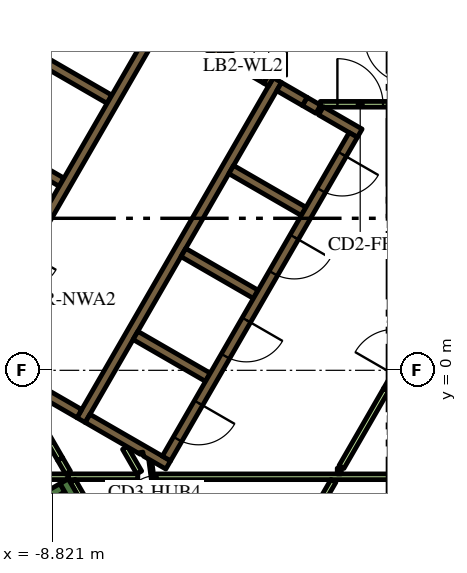
"""IFC4 building model, lengths in metres.
Left out: names, types, materials, properties, quantities, classifications, styles, units other than length and angle.
Written with IfcOpenShell. Run it as: python <this file> out.ifc"""

import sys

from ifc_helpers import new_model, si_unit, direction, frame, frame_2d, origin, place, context, subcontext, project, spatial, polyline, rectangle, outline, extrude, element, fill, save


model = new_model("IFC4")
c1 = context("Model", 3, precision=1e-05, world=origin(), true_north=direction((0.0, 1.0)))
c2 = subcontext(c1, "Body", "Model", "MODEL_VIEW")
j1 = project(units=[si_unit("LENGTHUNIT", "METRE"), si_unit("PLANEANGLEUNIT", "RADIAN")], contexts=[c1])
p1 = place(None, origin())
s1 = spatial("IfcSite", under=j1, at=p1, CompositionType="ELEMENT")
p2 = place(p1, origin())
s2 = spatial("IfcBuilding", under=s1, at=p2, CompositionType="ELEMENT")
p3 = place(p2, frame((0.0, 0.0, 62.7)))
s3 = spatial("IfcBuildingStorey", under=s2, at=p3, CompositionType="ELEMENT", Elevation=62.7)
p4 = place(p3, frame((-14.268, 0.387, 0.0), z_axis=(0.0, 0.0, 1.0), x_axis=(0.499994617707, 0.866028511231, 0.0)))
e1 = element("IfcWall", 1, at=p4, inside=s3, PredefinedType="SOLIDWALL", context=c2, shape_type="SweptSolid", body=[
    extrude(rectangle(XDim=18.817, YDim=0.9, at=frame_2d((9.409, 0.0))), origin(), (0.0, 0.0, 1.0), 3.9),
])
p5 = place(p3, frame((-14.44, -6.49, 0.0), z_axis=(0.0, 0.0, 1.0), x_axis=(0.866022966069, 0.500004222222, 0.0)))
e2 = element("IfcWall", 2, at=p5, inside=s3, PredefinedType="SOLIDWALL", context=c2, shape_type="SweptSolid", body=[
    extrude(rectangle(XDim=6.8, YDim=0.25, at=frame_2d((3.4, 0.0))), origin(), (0.0, 0.0, 1.0), 3.9),
])
p6 = place(p3, frame((-8.163, -3.511, 0.0), z_axis=(0.0, 0.0, 1.0), x_axis=(-0.500206266495, 0.865906283012, 0.0)))
e3 = element("IfcWall", 3, at=p6, inside=s3, PredefinedType="SOLIDWALL", context=c2, shape_type="SweptSolid", body=[
    extrude(rectangle(XDim=0.684, YDim=0.25, at=frame_2d((0.342, 0.0))), origin(), (0.0, 0.0, 1.0), 3.9),
])
p7 = place(p3, frame((-8.06, -1.311, 0.0), z_axis=(0.0, 0.0, 1.0), x_axis=(0.50000273126, 0.866023826885, 0.0)))
e4 = element("IfcWall", 4, at=p7, inside=s3, PredefinedType="SOLIDWALL", context=c2, shape_type="SweptSolid", body=[
    extrude(rectangle(XDim=10.33, YDim=0.25, at=frame_2d((5.165, 0.0))), origin(), (0.0, 0.0, 1.0), 3.9),
])
p8 = place(p3, frame((-1.819, 6.87, 0.0), z_axis=(0.0, 0.0, 1.0), x_axis=(-0.866294599386, 0.499533449405, 0.0)))
e5 = element("IfcWall", 5, at=p8, inside=s3, PredefinedType="SOLIDWALL", context=c2, shape_type="SweptSolid", body=[
    extrude(rectangle(XDim=0.41, YDim=0.25, at=frame_2d((0.205, 0.0))), origin(), (0.0, 0.0, 1.0), 3.9),
])
p9 = place(p3, frame((-2.849, 7.465, 0.0), z_axis=(0.0, 0.0, 1.0), x_axis=(0.865955664968, -0.500120771724, 0.0)))
e6 = element("IfcWall", 6, at=p9, inside=s3, PredefinedType="SOLIDWALL", context=c2, shape_type="SweptSolid", body=[
    extrude(rectangle(XDim=0.778, YDim=0.25, at=frame_2d((0.389, 0.0))), origin(), (0.0, 0.0, 1.0), 3.9),
])
p10 = place(p3, frame((-0.728, 6.24, 0.0), z_axis=(0.0, 0.0, 1.0), x_axis=(-0.866002680491, 0.500039355833, 0.0)))
e7 = element("IfcWall", 7, at=p10, inside=s3, PredefinedType="SOLIDWALL", context=c2, shape_type="SweptSolid", body=[
    extrude(rectangle(XDim=1.178, YDim=0.25, at=frame_2d((0.589, 0.0))), origin(), (0.0, 0.0, 1.0), 3.9),
])
for number, where, z_axis, x_axis in (
    (8, (-2.204, 4.182, 0.0), (0.0, 0.0, 1.0), (-0.866, 0.5, 0.0)),
    (9, (-5.369, 3.1, 0.0), (0.0, 0.0, 1.0), (0.866, -0.5, 0.0)),
    (10, (-4.724, -0.182, 0.0), (0.0, 0.0, 1.0), (-0.866, 0.5, 0.0)),
):
    element("IfcWall", number, at=place(p3, frame(where, z_axis=z_axis, x_axis=x_axis)), inside=s3, PredefinedType="SOLIDWALL", context=c2, shape_type="SweptSolid", body=[
        extrude(rectangle(XDim=2.2, YDim=0.25, at=frame_2d((1.1, 0.0))), origin(), (0.0, 0.0, 1.0), 3.9),
    ])
p11 = place(p3, origin())
e11 = element("IfcWall", 11, at=p11, inside=s3, PredefinedType="SOLIDWALL", context=c2, shape_type="SweptSolid", body=[
    extrude(outline(polyline([(-5.922, -2.257), (-5.922, -2.257), (-5.705, -2.382), (-5.83, -2.598), (-6.418, -2.258), (-6.433, -2.153), (-6.433, -2.153), (-6.433, -2.153), (-6.508, -2.163), (-6.508, -2.163), (-6.508, -2.163), (-6.501, -2.21), (-7.952, -1.373), (-7.827, -1.156), (-5.922, -2.257)])), origin(), (0.0, 0.0, 1.0), 3.9),
])
p12 = place(p3, frame((-9.265, -0.471, 0.0), z_axis=(0.0, 0.0, 1.0), x_axis=(0.865954634268, -0.500122556369, 0.0)))
e12 = element("IfcWall", 12, at=p12, inside=s3, PredefinedType="SOLIDWALL", context=c2, shape_type="SweptSolid", body=[
    extrude(rectangle(XDim=1.338, YDim=0.25, at=frame_2d((0.669, 0.0))), origin(), (0.0, 0.0, 1.0), 3.9),
])
e13 = element("IfcWall", 13, at=p11, inside=s3, PredefinedType="SOLIDWALL", context=c2, shape_type="SweptSolid", body=[
    extrude(outline(polyline([(-3.128, 7.481), (-3.259, 7.557), (-3.134, 7.773), (-3.003, 7.698), (-3.128, 7.481)])), origin(), (0.0, 0.0, 1.0), 3.9),
])
for number, where, z_axis, x_axis in (
    (14, (-8.574, 4.95, 0.0), (0.0, 0.0, 1.0), (-0.866, 0.5, 0.0)),
    (15, (-7.314, 7.132, 0.0), (0.0, 0.0, 1.0), (-0.866, 0.5, 0.0)),
):
    element("IfcWall", number, at=place(p3, frame(where, z_axis=z_axis, x_axis=x_axis)), inside=s3, PredefinedType="SOLIDWALL", context=c2, shape_type="SweptSolid", body=[
        extrude(rectangle(XDim=2.2, YDim=0.25, at=frame_2d((1.1, 0.0))), origin(), (0.0, 0.0, 1.0), 3.9),
    ])
p13 = place(p3, frame((-7.959, 10.415, 0.0), z_axis=(0.0, 0.0, 1.0), x_axis=(0.866020958405, -0.500007699544, 0.0)))
e16 = element("IfcWall", 16, at=p13, inside=s3, PredefinedType="SOLIDWALL", context=c2, shape_type="SweptSolid", body=[
    extrude(rectangle(XDim=4.1, YDim=0.25, at=frame_2d((2.05, 0.0))), origin(), (0.0, 0.0, 1.0), 3.9),
])
p14 = place(p3, frame((-8.395, -2.8, 0.0), z_axis=(0.0, 0.0, 1.0), x_axis=(1.0, 0.0, 0.0)))
e17 = element("IfcWall", 17, at=p14, inside=s3, PredefinedType="PARTITIONING", context=c2, shape_type="SweptSolid", body=[
    extrude(rectangle(XDim=1.828, YDim=0.15, at=frame_2d((0.914, 0.0))), origin(), (0.0, 0.0, 1.0), 2.75),
])
p15 = place(p3, frame((-11.115, -2.8, 0.0), z_axis=(0.0, 0.0, 1.0), x_axis=(1.0, 0.0, 0.0)))
e18 = element("IfcWall", 18, at=p15, inside=s3, PredefinedType="PARTITIONING", context=c2, shape_type="SweptSolid", body=[
    extrude(rectangle(XDim=2.708, YDim=0.15, at=frame_2d((1.354, 0.0))), origin(), (0.0, 0.0, 1.0), 2.75),
])
p16 = place(p3, frame((-6.531, -2.689, 0.0), z_axis=(0.0, 0.0, 1.0), x_axis=(-0.499967446111, 0.866044197965, 0.0)))
e19 = element("IfcWall", 19, at=p16, inside=s3, PredefinedType="PARTITIONING", context=c2, shape_type="SweptSolid", body=[
    extrude(rectangle(XDim=0.748, YDim=0.15, at=frame_2d((0.374, 0.0))), origin(), (0.0, 0.0, 1.0), 2.75),
])
p17 = place(p3, frame((-7.99, -3.412, 0.0), z_axis=(0.0, 0.0, 1.0), x_axis=(-0.500193841991, 0.86591346013, 0.0)))
e20 = element("IfcWall", 20, at=p17, inside=s3, PredefinedType="PARTITIONING", context=c2, shape_type="SweptSolid", body=[
    extrude(rectangle(XDim=0.583, YDim=0.15, at=frame_2d((0.292, 0.0))), origin(), (0.0, 0.0, 1.0), 2.75),
])
p18 = place(p3, frame((-8.612, -2.333, 0.0), z_axis=(0.0, 0.0, 1.0), x_axis=(0.500248216681, -0.86588204838, 0.0)))
e21 = element("IfcWall", 21, at=p18, inside=s3, PredefinedType="PARTITIONING", context=c2, shape_type="SweptSolid", body=[
    extrude(rectangle(XDim=0.415, YDim=0.15, at=frame_2d((0.208, 0.0))), origin(), (0.0, 0.0, 1.0), 2.75),
])
p19 = place(p3, frame((-6.086, -2.801, 0.0), z_axis=(0.0, 0.0, 1.0), x_axis=(1.0, 0.0, 0.0)))
e22 = element("IfcWall", 22, at=p19, inside=s3, PredefinedType="PARTITIONING", context=c2, shape_type="SweptSolid", body=[
    extrude(rectangle(XDim=7.524, YDim=0.15, at=frame_2d((3.762, 0.0))), origin(), (0.0, 0.0, 1.0), 2.75),
])
p20 = place(p3, frame((-1.887, -3.718, 0.0), z_axis=(0.0, 0.0, 1.0), x_axis=(0.499842898591, 0.866116087328, 0.0)))
e23 = element("IfcWall", 23, at=p20, inside=s3, PredefinedType="PARTITIONING", context=c2, shape_type="SweptSolid", body=[
    extrude(rectangle(XDim=0.936, YDim=0.15, at=frame_2d((0.468, 0.0))), origin(), (0.0, 0.0, 1.0), 2.75),
])
p21 = place(p3, frame((-1.212, -2.651, 0.0), z_axis=(0.0, 0.0, 1.0), x_axis=(-1.0, 0.0, 0.0)))
e24 = element("IfcWall", 24, at=p21, inside=s3, PredefinedType="PARTITIONING", context=c2, shape_type="SweptSolid", body=[
    extrude(rectangle(XDim=0.108, YDim=0.15, at=frame_2d((0.054, 0.0))), origin(), (0.0, 0.0, 1.0), 2.75),
])
p22 = place(p3, frame((-1.208, -2.544, 0.0), z_axis=(0.0, 0.0, 1.0), x_axis=(0.499995339376, 0.86602809458, 0.0)))
e25 = element("IfcWall", 25, at=p22, inside=s3, PredefinedType="PARTITIONING", context=c2, shape_type="SweptSolid", body=[
    extrude(rectangle(XDim=2.349, YDim=0.15, at=frame_2d((1.175, 0.0))), origin(), (0.0, 0.0, 1.0), 2.75),
])
p23 = place(p3, frame((-6.008, 9.144, 0.0), z_axis=(0.0, 0.0, 1.0), x_axis=(-0.500006956611, -0.866021387346, 0.0)))
e26 = element("IfcWall", 26, at=p23, inside=s3, PredefinedType="SOLIDWALL", context=c2, shape_type="SweptSolid", body=[
    extrude(rectangle(XDim=9.83, YDim=0.25, at=frame_2d((4.915, 0.0))), origin(), (0.0, 0.0, 1.0), 3.9),
])
p24 = place(p23, frame((6.985, 0.0, 0.0)))
e27 = element("IfcOpeningElement", 27, at=p24, cuts=e26, PredefinedType="OPENING", context=c2, shape_type="SweptSolid", body=[
    extrude(rectangle(XDim=0.9, YDim=2.1, at=frame_2d((0.45, 1.05))), frame((0.0, 0.135, 0.0), z_axis=(0.0, -1.0, 0.0), x_axis=(1.0, 0.0, 0.0)), (0.0, 0.0, 1.0), 0.27),
])
p25 = place(p3, frame((-0.898, 6.194, 0.0), z_axis=(0.0, 0.0, 1.0), x_axis=(-0.499996202215, -0.866027596426, 0.0)))
e28 = element("IfcWall", 28, at=p25, inside=s3, PredefinedType="SOLIDWALL", context=c2, shape_type="SweptSolid", body=[
    extrude(rectangle(XDim=9.83, YDim=0.25, at=frame_2d((4.915, 0.0))), origin(), (0.0, 0.0, 1.0), 3.9),
])
p26 = place(p25, frame((0.585, 0.0, 0.0)))
e29 = element("IfcOpeningElement", 29, at=p26, cuts=e28, PredefinedType="OPENING", context=c2, shape_type="SweptSolid", body=[
    extrude(rectangle(XDim=1.1, YDim=2.1, at=frame_2d((0.55, 1.05))), frame((0.0, 0.135, 0.0), z_axis=(0.0, -1.0, 0.0), x_axis=(1.0, 0.0, 0.0)), (0.0, 0.0, 1.0), 0.27),
])
p27 = place(p25, frame((3.105, 0.0, 0.0)))
e30 = element("IfcOpeningElement", 30, at=p27, cuts=e28, PredefinedType="OPENING", context=c2, shape_type="SweptSolid", body=[
    extrude(rectangle(XDim=1.1, YDim=2.1, at=frame_2d((0.55, 1.05))), frame((0.0, 0.135, 0.0), z_axis=(0.0, -1.0, 0.0), x_axis=(1.0, 0.0, 0.0)), (0.0, 0.0, 1.0), 0.27),
])
p28 = place(p25, frame((5.625, 0.0, 0.0)))
e31 = element("IfcOpeningElement", 31, at=p28, cuts=e28, PredefinedType="OPENING", context=c2, shape_type="SweptSolid", body=[
    extrude(rectangle(XDim=1.1, YDim=2.1, at=frame_2d((0.55, 1.05))), frame((0.0, 0.135, 0.0), z_axis=(0.0, -1.0, 0.0), x_axis=(1.0, 0.0, 0.0)), (0.0, 0.0, 1.0), 0.27),
])
p29 = place(p25, frame((8.145, 0.0, 0.0)))
e32 = element("IfcOpeningElement", 32, at=p29, cuts=e28, PredefinedType="OPENING", context=c2, shape_type="SweptSolid", body=[
    extrude(rectangle(XDim=1.1, YDim=2.1, at=frame_2d((0.55, 1.05))), frame((0.0, 0.135, 0.0), z_axis=(0.0, -1.0, 0.0), x_axis=(1.0, 0.0, 0.0)), (0.0, 0.0, 1.0), 0.27),
])
p30 = place(p3, frame((-1.765, 7.0, 0.0), z_axis=(0.0, 0.0, 1.0), x_axis=(1.0, 0.0, 0.0)))
e33 = element("IfcWall", 33, at=p30, inside=s3, PredefinedType="PARTITIONING", context=c2, shape_type="SweptSolid", body=[
    extrude(rectangle(XDim=2.1, YDim=0.15, at=frame_2d((1.05, 0.0))), origin(), (0.0, 0.0, 1.0), 2.75),
])
p31 = place(p30, frame((0.45, 0.0, 0.0)))
e34 = element("IfcOpeningElement", 34, at=p31, cuts=e33, PredefinedType="OPENING", context=c2, shape_type="SweptSolid", body=[
    extrude(rectangle(XDim=1.2, YDim=2.1, at=frame_2d((0.6, 1.05))), frame((0.0, 0.085, 0.0), z_axis=(0.0, -1.0, 0.0), x_axis=(1.0, 0.0, 0.0)), (0.0, 0.0, 1.0), 0.17),
])
p32 = place(p3, frame((-0.034, -0.509, 0.0), z_axis=(0.0, 0.0, 1.0), x_axis=(0.49994051562, 0.866059744384, 0.0)))
e35 = element("IfcWall", 35, at=p32, inside=s3, PredefinedType="PARTITIONING", context=c2, shape_type="SweptSolid", body=[
    extrude(rectangle(XDim=2.1, YDim=0.15, at=frame_2d((1.05, 0.0))), origin(), (0.0, 0.0, 1.0), 2.75),
])
p33 = place(p32, frame((0.45, 0.0, 0.0)))
e36 = element("IfcOpeningElement", 36, at=p33, cuts=e35, PredefinedType="OPENING", context=c2, shape_type="SweptSolid", body=[
    extrude(rectangle(XDim=1.2, YDim=2.1, at=frame_2d((0.6, 1.05))), frame((0.0, 0.085, 0.0), z_axis=(0.0, -1.0, 0.0), x_axis=(1.0, 0.0, 0.0)), (0.0, 0.0, 1.0), 0.17),
])
p34 = place(p3, frame((-5.995, -4.213, 0.0), z_axis=(0.0, 0.0, 1.0), x_axis=(-0.132072335448, 0.991240081014, 0.0)))
e37 = element("IfcWall", 37, at=p34, inside=s3, PredefinedType="PARTITIONING", context=c2, shape_type="SweptSolid", body=[
    extrude(rectangle(XDim=2.1, YDim=0.076, at=frame_2d((1.05, 0.0))), origin(), (0.0, 0.0, 1.0), 2.75),
])
p35 = place(p34, frame((0.55, 0.0, 0.0)))
e38 = element("IfcOpeningElement", 38, at=p35, cuts=e37, PredefinedType="OPENING", context=c2, shape_type="SweptSolid", body=[
    extrude(rectangle(XDim=0.9, YDim=2.1, at=frame_2d((0.45, 1.05))), frame((0.0, 0.048, 0.0), z_axis=(0.0, -1.0, 0.0), x_axis=(1.0, 0.0, 0.0)), (0.0, 0.0, 1.0), 0.096),
])
p36 = place(p3, frame((-4.409, 8.365, 0.0), z_axis=(0.0, 0.0, 1.0), x_axis=(0.866034573852, -0.49998411664, 0.0)))
e39 = element("IfcWall", 39, at=p36, inside=s3, PredefinedType="SOLIDWALL", context=c2, shape_type="SweptSolid", body=[
    extrude(rectangle(XDim=1.4, YDim=0.25, at=frame_2d((0.7, 0.0))), origin(), (0.0, 0.0, 1.0), 3.9),
])
p37 = place(p36, frame((0.1, 0.0, 0.0)))
e40 = element("IfcOpeningElement", 40, at=p37, cuts=e39, PredefinedType="OPENING", context=c2, shape_type="SweptSolid", body=[
    extrude(rectangle(XDim=1.2, YDim=2.1, at=frame_2d((0.6, 1.05))), frame((0.0, 0.135, 0.0), z_axis=(0.0, -1.0, 0.0), x_axis=(1.0, 0.0, 0.0)), (0.0, 0.0, 1.0), 0.27),
])
p38 = place(p3, frame((-8.612, -2.333, 0.0), z_axis=(0.0, 0.0, 1.0), x_axis=(-0.499961193289, 0.866047807691, 0.0)))
e41 = element("IfcWall", 41, at=p38, inside=s3, PredefinedType="PARTITIONING", context=c2, shape_type="SweptSolid", body=[
    extrude(rectangle(XDim=1.8, YDim=0.15, at=frame_2d((0.9, 0.0))), origin(), (0.0, 0.0, 1.0), 2.75),
])
p39 = place(p38, frame((0.45, 0.0, 0.0)))
e42 = element("IfcOpeningElement", 42, at=p39, cuts=e41, PredefinedType="OPENING", context=c2, shape_type="SweptSolid", body=[
    extrude(rectangle(XDim=0.9, YDim=2.1, at=frame_2d((0.45, 1.05))), frame((0.0, 0.085, 0.0), z_axis=(0.0, -1.0, 0.0), x_axis=(1.0, 0.0, 0.0)), (0.0, 0.0, 1.0), 0.17),
])
p40 = place(p3, frame((-19.081, -3.9, 0.0), z_axis=(0.0, 0.0, 1.0), x_axis=(0.499998313975, 0.866026377209, 0.0)))
e43 = element("IfcWall", 43, at=p40, inside=s3, PredefinedType="PARTITIONING", context=c2, shape_type="SweptSolid", body=[
    extrude(rectangle(XDim=25.766, YDim=0.15, at=frame_2d((12.883, 0.0))), origin(), (0.0, 0.0, 1.0), 2.75),
])
p41 = place(p40, frame((24.586, 0.0, 0.0)))
e44 = element("IfcOpeningElement", 44, at=p41, cuts=e43, PredefinedType="OPENING", context=c2, shape_type="SweptSolid", body=[
    extrude(rectangle(XDim=1.0, YDim=2.1, at=frame_2d((0.5, 1.05))), frame((0.0, 0.085, 0.0), z_axis=(0.0, -1.0, 0.0), x_axis=(1.0, 0.0, 0.0)), (0.0, 0.0, 1.0), 0.17),
])
p42 = place(p40, frame((9.948, 0.0, 0.0)))
e45 = element("IfcOpeningElement", 45, at=p42, cuts=e43, PredefinedType="OPENING", context=c2, shape_type="SweptSolid", body=[
    extrude(rectangle(XDim=1.0, YDim=2.1, at=frame_2d((0.5, 1.05))), frame((0.0, 0.085, 0.0), z_axis=(0.0, -1.0, 0.0), x_axis=(1.0, 0.0, 0.0)), (0.0, 0.0, 1.0), 0.17),
])
p43 = place(p40, frame((7.782, 0.0, 0.0)))
e46 = element("IfcOpeningElement", 46, at=p43, cuts=e43, PredefinedType="OPENING", context=c2, shape_type="SweptSolid", body=[
    extrude(rectangle(XDim=0.9, YDim=2.1, at=frame_2d((0.45, 1.05))), frame((0.0, 0.085, 0.0), z_axis=(0.0, -1.0, 0.0), x_axis=(1.0, 0.0, 0.0)), (0.0, 0.0, 1.0), 0.17),
])
p44 = place(p40, frame((4.658, 0.0, 0.0)))
e47 = element("IfcOpeningElement", 47, at=p44, cuts=e43, PredefinedType="OPENING", context=c2, shape_type="SweptSolid", body=[
    extrude(rectangle(XDim=0.9, YDim=2.1, at=frame_2d((0.45, 1.05))), frame((0.0, 0.085, 0.0), z_axis=(0.0, -1.0, 0.0), x_axis=(1.0, 0.0, 0.0)), (0.0, 0.0, 1.0), 0.17),
])
p45 = place(p26, origin())
e48 = element("IfcDoor", 48, at=p45, inside=s3, OperationType="DOUBLE_DOOR_SLIDING", PredefinedType="DOOR", context=c2, shape_type="SweptSolid", body=[
    extrude(rectangle(XDim=1.1, YDim=2.1, at=frame_2d((0.55, 1.05))), frame((0.0, 0.025, 0.0), z_axis=(0.0, -1.0, 0.0), x_axis=(1.0, 0.0, 0.0)), (0.0, 0.0, 1.0), 0.05),
])
fill(e29, e48)
p46 = place(p27, origin())
e49 = element("IfcDoor", 49, at=p46, inside=s3, OperationType="DOUBLE_DOOR_SLIDING", PredefinedType="DOOR", context=c2, shape_type="SweptSolid", body=[
    extrude(rectangle(XDim=1.1, YDim=2.1, at=frame_2d((0.55, 1.05))), frame((0.0, 0.025, 0.0), z_axis=(0.0, -1.0, 0.0), x_axis=(1.0, 0.0, 0.0)), (0.0, 0.0, 1.0), 0.05),
])
fill(e30, e49)
p47 = place(p28, origin())
e50 = element("IfcDoor", 50, at=p47, inside=s3, OperationType="DOUBLE_DOOR_SLIDING", PredefinedType="DOOR", context=c2, shape_type="SweptSolid", body=[
    extrude(rectangle(XDim=1.1, YDim=2.1, at=frame_2d((0.55, 1.05))), frame((0.0, 0.025, 0.0), z_axis=(0.0, -1.0, 0.0), x_axis=(1.0, 0.0, 0.0)), (0.0, 0.0, 1.0), 0.05),
])
fill(e31, e50)
p48 = place(p29, origin())
e51 = element("IfcDoor", 51, at=p48, inside=s3, OperationType="DOUBLE_DOOR_SLIDING", PredefinedType="DOOR", context=c2, shape_type="SweptSolid", body=[
    extrude(rectangle(XDim=1.1, YDim=2.1, at=frame_2d((0.55, 1.05))), frame((0.0, 0.025, 0.0), z_axis=(0.0, -1.0, 0.0), x_axis=(1.0, 0.0, 0.0)), (0.0, 0.0, 1.0), 0.05),
])
fill(e32, e51)
p49 = place(p31, origin())
e52 = element("IfcDoor", 52, at=p49, inside=s3, OperationType="SINGLE_SWING_LEFT", PredefinedType="DOOR", context=c2, shape_type="SweptSolid", body=[
    extrude(rectangle(XDim=1.2, YDim=2.1, at=frame_2d((0.6, 1.05))), frame((0.0, 0.025, 0.0), z_axis=(0.0, -1.0, 0.0), x_axis=(1.0, 0.0, 0.0)), (0.0, 0.0, 1.0), 0.05),
])
fill(e34, e52)
p50 = place(p35, origin())
e53 = element("IfcDoor", 53, at=p50, inside=s3, OperationType="SINGLE_SWING_LEFT", PredefinedType="DOOR", context=c2, shape_type="SweptSolid", body=[
    extrude(rectangle(XDim=0.9, YDim=2.1, at=frame_2d((0.45, 1.05))), frame((0.0, 0.025, 0.0), z_axis=(0.0, -1.0, 0.0), x_axis=(1.0, 0.0, 0.0)), (0.0, 0.0, 1.0), 0.05),
])
fill(e38, e53)
p51 = place(p37, origin())
e54 = element("IfcDoor", 54, at=p51, inside=s3, OperationType="SINGLE_SWING_LEFT", PredefinedType="DOOR", context=c2, shape_type="SweptSolid", body=[
    extrude(rectangle(XDim=1.2, YDim=2.1, at=frame_2d((0.6, 1.05))), frame((0.0, 0.025, 0.0), z_axis=(0.0, -1.0, 0.0), x_axis=(1.0, 0.0, 0.0)), (0.0, 0.0, 1.0), 0.05),
])
fill(e40, e54)
p52 = place(p39, origin())
e55 = element("IfcDoor", 55, at=p52, inside=s3, OperationType="SINGLE_SWING_LEFT", PredefinedType="DOOR", context=c2, shape_type="SweptSolid", body=[
    extrude(rectangle(XDim=0.9, YDim=2.1, at=frame_2d((0.45, 1.05))), frame((0.0, 0.025, 0.0), z_axis=(0.0, -1.0, 0.0), x_axis=(1.0, 0.0, 0.0)), (0.0, 0.0, 1.0), 0.05),
])
fill(e42, e55)
save(model, sys.argv[1])
